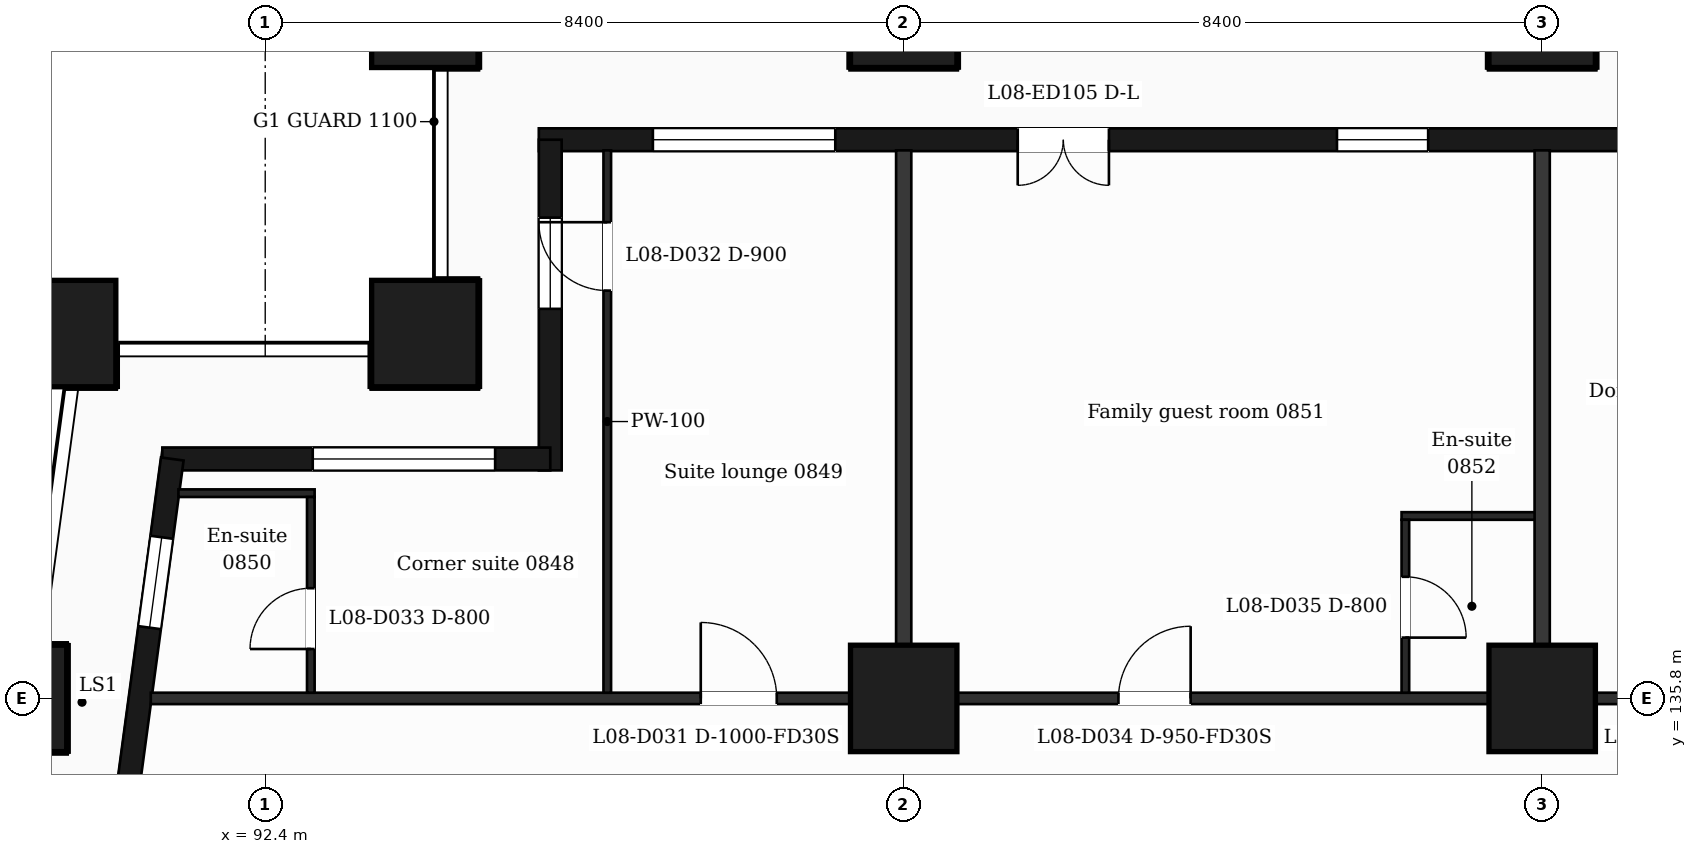
"""IFC4 building model, lengths in metres.
Left out: names, types, materials, properties, quantities, classifications, styles, units other than length and angle.
Written with IfcOpenShell. Run it as: python <this file> out.ifc"""

import sys

from ifc_helpers import new_model, si_unit, direction, frame, frame_2d, origin, origin_2d, place, context, subcontext, project, spatial, rectangle, extrude, element, fill, save


model = new_model("IFC4")
c1 = context("Model", 3, precision=1e-05, world=origin(), true_north=direction((0.0, 1.0)))
c2 = subcontext(c1, "Body", "Model", "MODEL_VIEW")
j1 = project(units=[si_unit("LENGTHUNIT", "METRE"), si_unit("PLANEANGLEUNIT", "RADIAN")], contexts=[c1])
p1 = place(None, origin())
s1 = spatial("IfcSite", under=j1, at=p1, CompositionType="ELEMENT")
p2 = place(p1, origin())
s2 = spatial("IfcBuilding", under=s1, at=p2, CompositionType="ELEMENT")
p3 = place(p2, frame((0.0, 0.0, 46.0)))
s3 = spatial("IfcBuildingStorey", under=s2, at=p3, CompositionType="ELEMENT", Elevation=46.0)
for number, where, z_axis, x_axis in (
    (1, (94.5, 140.6, 0.0), (0.0, 0.0, 1.0), (1.0, 0.0, 0.0)),
    (2, (89.735, 140.6, 0.0), (0.0, 0.0, 1.0), (1.0, 0.0, 0.0)),
    (3, (100.8, 135.8, 0.0), (0.0, 0.0, 1.0), (1.0, 0.0, 0.0)),
    (4, (109.2, 135.8, 0.0), (0.0, 0.0, 1.0), (1.0, 0.0, 0.0)),
    (5, (89.088, 135.8, 0.0), (0.0, 0.0, 1.0), (1.0, 0.0, 0.0)),
    (6, (100.8, 144.8, 0.0), (0.0, 0.0, 1.0), (1.0, 0.0, 0.0)),
    (7, (109.2, 144.8, 0.0), (0.0, 0.0, 1.0), (1.0, 0.0, 0.0)),
    (8, (94.5, 144.8, 0.0), (0.0, 0.0, 1.0), (1.0, 0.0, 0.0)),
):
    element("IfcColumn", number, at=place(p3, frame(where, z_axis=z_axis, x_axis=x_axis)), inside=s3, PredefinedType="COLUMN", context=c2, shape_type="SweptSolid", body=[
        extrude(rectangle(XDim=1.4, YDim=1.4, at=origin_2d()), origin(), (0.0, 0.0, 1.0), 3.5),
    ])
p4 = place(p3, frame((110.4, 143.15, 0.0), z_axis=(0.0, 0.0, 1.0), x_axis=(-1.0, 0.0, 0.0)))
e9 = element("IfcWall", 9, at=p4, inside=s3, PredefinedType="SOLIDWALL", context=c2, shape_type="SweptSolid", body=[
    extrude(rectangle(XDim=14.4, YDim=0.3, at=frame_2d((7.2, 0.0))), origin(), (0.0, 0.0, 1.0), 3.18),
])
p5 = place(p4, frame((2.7, 0.0, 0.9)))
e10 = element("IfcOpeningElement", 10, at=p5, cuts=e9, PredefinedType="OPENING", context=c2, shape_type="SweptSolid", body=[
    extrude(rectangle(XDim=1.2, YDim=2.1, at=frame_2d((0.6, 1.05))), frame((0.0, 0.16, 0.0), z_axis=(0.0, -1.0, 0.0), x_axis=(1.0, 0.0, 0.0)), (0.0, 0.0, 1.0), 0.32),
])
p6 = place(p4, frame((6.9, 0.0, 0.0)))
e11 = element("IfcOpeningElement", 11, at=p6, cuts=e9, PredefinedType="OPENING", context=c2, shape_type="SweptSolid", body=[
    extrude(rectangle(XDim=1.2, YDim=2.4, at=frame_2d((0.6, 1.2))), frame((0.0, 0.16, 0.0), z_axis=(0.0, -1.0, 0.0), x_axis=(1.0, 0.0, 0.0)), (0.0, 0.0, 1.0), 0.32),
])
p7 = place(p4, frame((10.5, 0.0, 0.9)))
e12 = element("IfcOpeningElement", 12, at=p7, cuts=e9, PredefinedType="OPENING", context=c2, shape_type="SweptSolid", body=[
    extrude(rectangle(XDim=2.4, YDim=2.1, at=frame_2d((1.2, 1.05))), frame((0.0, 0.16, 0.0), z_axis=(0.0, -1.0, 0.0), x_axis=(1.0, 0.0, 0.0)), (0.0, 0.0, 1.0), 0.32),
])
p8 = place(p3, frame((96.15, 143.15, 0.0), z_axis=(0.0, 0.0, 1.0), x_axis=(0.0, -1.0, 0.0)))
e13 = element("IfcWall", 13, at=p8, inside=s3, PredefinedType="SOLIDWALL", context=c2, shape_type="SweptSolid", body=[
    extrude(rectangle(XDim=4.35, YDim=0.3, at=frame_2d((2.175, 0.0))), origin(), (0.0, 0.0, 1.0), 3.18),
])
p9 = place(p8, frame((1.025, 0.0, 0.9)))
e14 = element("IfcOpeningElement", 14, at=p9, cuts=e13, PredefinedType="OPENING", context=c2, shape_type="SweptSolid", body=[
    extrude(rectangle(XDim=1.2, YDim=2.1, at=frame_2d((0.6, 1.05))), frame((0.0, 0.16, 0.0), z_axis=(0.0, -1.0, 0.0), x_axis=(1.0, 0.0, 0.0)), (0.0, 0.0, 1.0), 0.32),
])
p10 = place(p3, frame((96.15, 138.95, 0.0), z_axis=(0.0, 0.0, 1.0), x_axis=(-1.0, 0.0, 0.0)))
e15 = element("IfcWall", 15, at=p10, inside=s3, PredefinedType="SOLIDWALL", context=c2, shape_type="SweptSolid", body=[
    extrude(rectangle(XDim=5.104, YDim=0.3, at=frame_2d((2.552, 0.0))), origin(), (0.0, 0.0, 1.0), 3.18),
])
p11 = place(p10, frame((0.725, 0.0, 0.9)))
e16 = element("IfcOpeningElement", 16, at=p11, cuts=e15, PredefinedType="OPENING", context=c2, shape_type="SweptSolid", body=[
    extrude(rectangle(XDim=2.4, YDim=2.1, at=frame_2d((1.2, 1.05))), frame((0.0, 0.16, 0.0), z_axis=(0.0, -1.0, 0.0), x_axis=(1.0, 0.0, 0.0)), (0.0, 0.0, 1.0), 0.32),
])
p12 = place(p3, frame((91.177, 138.95, 0.0), z_axis=(0.0, 0.0, 1.0), x_axis=(-0.133426664613, -0.991058689065, 0.0)))
e17 = element("IfcWall", 17, at=p12, inside=s3, PredefinedType="SOLIDWALL", context=c2, shape_type="SweptSolid", body=[
    extrude(rectangle(XDim=6.609, YDim=0.3, at=frame_2d((3.305, 0.0))), origin(), (0.0, 0.0, 1.0), 3.18),
])
p13 = place(p12, frame((1.039, 0.0, 0.9)))
e18 = element("IfcOpeningElement", 18, at=p13, cuts=e17, PredefinedType="OPENING", context=c2, shape_type="SweptSolid", body=[
    extrude(rectangle(XDim=1.2, YDim=2.1, at=frame_2d((0.6, 1.05))), frame((0.0, 0.16, 0.0), z_axis=(0.0, -1.0, 0.0), x_axis=(1.0, 0.0, 0.0)), (0.0, 0.0, 1.0), 0.32),
])
p14 = place(p12, frame((4.294, 0.0, 0.0)))
e19 = element("IfcOpeningElement", 19, at=p14, cuts=e17, PredefinedType="OPENING", context=c2, shape_type="SweptSolid", body=[
    extrude(rectangle(XDim=1.2, YDim=2.4, at=frame_2d((0.6, 1.2))), frame((0.0, 0.16, 0.0), z_axis=(0.0, -1.0, 0.0), x_axis=(1.0, 0.0, 0.0)), (0.0, 0.0, 1.0), 0.32),
])
p15 = place(p3, frame((90.895, 135.8, 0.0), z_axis=(0.0, 0.0, 1.0), x_axis=(1.0, 0.0, 0.0)))
e20 = element("IfcWall", 20, at=p15, inside=s3, PredefinedType="PARTITIONING", context=c2, shape_type="SweptSolid", body=[
    extrude(rectangle(XDim=45.011, YDim=0.15, at=frame_2d((22.505, 0.0))), origin(), (0.0, 0.0, 1.0), 3.18),
])
p16 = place(p15, frame((7.235, 0.0, 0.0)))
e21 = element("IfcOpeningElement", 21, at=p16, cuts=e20, PredefinedType="OPENING", context=c2, shape_type="SweptSolid", body=[
    extrude(rectangle(XDim=1.0, YDim=2.1, at=frame_2d((0.5, 1.05))), frame((0.0, 0.085, 0.0), z_axis=(0.0, -1.0, 0.0), x_axis=(1.0, 0.0, 0.0)), (0.0, 0.0, 1.0), 0.17),
])
p17 = place(p15, frame((12.73, 0.0, 0.0)))
e22 = element("IfcOpeningElement", 22, at=p17, cuts=e20, PredefinedType="OPENING", context=c2, shape_type="SweptSolid", body=[
    extrude(rectangle(XDim=0.95, YDim=2.1, at=frame_2d((0.475, 1.05))), frame((0.0, 0.085, 0.0), z_axis=(0.0, -1.0, 0.0), x_axis=(1.0, 0.0, 0.0)), (0.0, 0.0, 1.0), 0.17),
])
p18 = place(p15, frame((20.185, 0.0, 0.0)))
e23 = element("IfcOpeningElement", 23, at=p18, cuts=e20, PredefinedType="OPENING", context=c2, shape_type="SweptSolid", body=[
    extrude(rectangle(XDim=0.95, YDim=2.1, at=frame_2d((0.475, 1.05))), frame((0.0, 0.085, 0.0), z_axis=(0.0, -1.0, 0.0), x_axis=(1.0, 0.0, 0.0)), (0.0, 0.0, 1.0), 0.17),
])
p19 = place(p15, frame((24.531, 0.0, 0.0)))
e24 = element("IfcOpeningElement", 24, at=p19, cuts=e20, PredefinedType="OPENING", context=c2, shape_type="SweptSolid", body=[
    extrude(rectangle(XDim=1.0, YDim=2.1, at=frame_2d((0.5, 1.05))), frame((0.0, 0.085, 0.0), z_axis=(0.0, -1.0, 0.0), x_axis=(1.0, 0.0, 0.0)), (0.0, 0.0, 1.0), 0.17),
])
p20 = place(p15, frame((39.814, 0.0, 0.0)))
e25 = element("IfcOpeningElement", 25, at=p20, cuts=e20, PredefinedType="OPENING", context=c2, shape_type="SweptSolid", body=[
    extrude(rectangle(XDim=0.95, YDim=2.1, at=frame_2d((0.475, 1.05))), frame((0.0, 0.085, 0.0), z_axis=(0.0, -1.0, 0.0), x_axis=(1.0, 0.0, 0.0)), (0.0, 0.0, 1.0), 0.17),
])
p21 = place(p3, frame((107.35, 138.2, 0.0), z_axis=(0.0, 0.0, 1.0), x_axis=(1.0, 0.0, 0.0)))
e26 = element("IfcWall", 26, at=p21, inside=s3, PredefinedType="PARTITIONING", context=c2, shape_type="SweptSolid", body=[
    extrude(rectangle(XDim=1.85, YDim=0.1, at=frame_2d((0.925, 0.0))), origin(), (0.0, 0.0, 1.0), 3.18),
])
p22 = place(p3, frame((91.258, 138.5, 0.0), z_axis=(0.0, 0.0, 1.0), x_axis=(1.0, 0.0, 0.0)))
e27 = element("IfcWall", 27, at=p22, inside=s3, PredefinedType="PARTITIONING", context=c2, shape_type="SweptSolid", body=[
    extrude(rectangle(XDim=1.792, YDim=0.1, at=frame_2d((0.896, 0.0))), origin(), (0.0, 0.0, 1.0), 3.18),
])
p23 = place(p3, frame((93.0, 135.875, 0.0), z_axis=(0.0, 0.0, 1.0), x_axis=(0.0, 1.0, 0.0)))
e28 = element("IfcWall", 28, at=p23, inside=s3, PredefinedType="PARTITIONING", context=c2, shape_type="SweptSolid", body=[
    extrude(rectangle(XDim=2.575, YDim=0.1, at=frame_2d((1.288, 0.0))), origin(), (0.0, 0.0, 1.0), 3.18),
])
p24 = place(p23, frame((0.575, 0.0, 0.0)))
e29 = element("IfcOpeningElement", 29, at=p24, cuts=e28, PredefinedType="OPENING", context=c2, shape_type="SweptSolid", body=[
    extrude(rectangle(XDim=0.8, YDim=2.1, at=frame_2d((0.4, 1.05))), frame((0.0, 0.06, 0.0), z_axis=(0.0, -1.0, 0.0), x_axis=(1.0, 0.0, 0.0)), (0.0, 0.0, 1.0), 0.12),
])
p25 = place(p3, frame((96.9, 135.875, 0.0), z_axis=(0.0, 0.0, 1.0), x_axis=(0.0, 1.0, 0.0)))
e30 = element("IfcWall", 30, at=p25, inside=s3, PredefinedType="PARTITIONING", context=c2, shape_type="SweptSolid", body=[
    extrude(rectangle(XDim=7.135, YDim=0.1, at=frame_2d((3.567, 0.0))), origin(), (0.0, 0.0, 1.0), 3.18),
])
p26 = place(p25, frame((5.29, 0.0, 0.0)))
e31 = element("IfcOpeningElement", 31, at=p26, cuts=e30, PredefinedType="OPENING", context=c2, shape_type="SweptSolid", body=[
    extrude(rectangle(XDim=0.9, YDim=2.1, at=frame_2d((0.45, 1.05))), frame((0.0, 0.06, 0.0), z_axis=(0.0, -1.0, 0.0), x_axis=(1.0, 0.0, 0.0)), (0.0, 0.0, 1.0), 0.12),
])
p27 = place(p3, frame((100.8, 135.875, 0.0), z_axis=(0.0, 0.0, 1.0), x_axis=(0.0, 1.0, 0.0)))
e32 = element("IfcWall", 32, at=p27, inside=s3, PredefinedType="PARTITIONING", context=c2, shape_type="SweptSolid", body=[
    extrude(rectangle(XDim=7.135, YDim=0.2, at=frame_2d((3.567, 0.0))), origin(), (0.0, 0.0, 1.0), 3.18),
])
p28 = place(p3, frame((107.4, 135.875, 0.0), z_axis=(0.0, 0.0, 1.0), x_axis=(0.0, 1.0, 0.0)))
e33 = element("IfcWall", 33, at=p28, inside=s3, PredefinedType="PARTITIONING", context=c2, shape_type="SweptSolid", body=[
    extrude(rectangle(XDim=2.275, YDim=0.1, at=frame_2d((1.137, 0.0))), origin(), (0.0, 0.0, 1.0), 3.18),
])
p29 = place(p28, frame((0.725, 0.0, 0.0)))
e34 = element("IfcOpeningElement", 34, at=p29, cuts=e33, PredefinedType="OPENING", context=c2, shape_type="SweptSolid", body=[
    extrude(rectangle(XDim=0.8, YDim=2.1, at=frame_2d((0.4, 1.05))), frame((0.0, 0.06, 0.0), z_axis=(0.0, -1.0, 0.0), x_axis=(1.0, 0.0, 0.0)), (0.0, 0.0, 1.0), 0.12),
])
p30 = place(p3, frame((109.2, 135.875, 0.0), z_axis=(0.0, 0.0, 1.0), x_axis=(0.0, 1.0, 0.0)))
e35 = element("IfcWall", 35, at=p30, inside=s3, PredefinedType="PARTITIONING", context=c2, shape_type="SweptSolid", body=[
    extrude(rectangle(XDim=7.135, YDim=0.2, at=frame_2d((3.567, 0.0))), origin(), (0.0, 0.0, 1.0), 3.18),
])
p31 = place(p5, origin())
e36 = element("IfcWindow", 36, at=p31, inside=s3, PartitioningType="SINGLE_PANEL", PredefinedType="WINDOW", context=c2, shape_type="SweptSolid", body=[
    extrude(rectangle(XDim=1.2, YDim=2.1, at=frame_2d((0.6, 1.05))), frame((0.0, 0.03, 0.0), z_axis=(0.0, -1.0, 0.0), x_axis=(1.0, 0.0, 0.0)), (0.0, 0.0, 1.0), 0.06),
])
fill(e10, e36)
p32 = place(p6, origin())
e37 = element("IfcDoor", 37, at=p32, inside=s3, OperationType="DOUBLE_DOOR_SINGLE_SWING", PredefinedType="DOOR", context=c2, shape_type="SweptSolid", body=[
    extrude(rectangle(XDim=1.2, YDim=2.4, at=frame_2d((0.6, 1.2))), frame((0.0, 0.025, 0.0), z_axis=(0.0, -1.0, 0.0), x_axis=(1.0, 0.0, 0.0)), (0.0, 0.0, 1.0), 0.05),
])
fill(e11, e37)
p33 = place(p7, origin())
e38 = element("IfcWindow", 38, at=p33, inside=s3, PartitioningType="SINGLE_PANEL", PredefinedType="WINDOW", context=c2, shape_type="SweptSolid", body=[
    extrude(rectangle(XDim=2.4, YDim=2.1, at=frame_2d((1.2, 1.05))), frame((0.0, 0.03, 0.0), z_axis=(0.0, -1.0, 0.0), x_axis=(1.0, 0.0, 0.0)), (0.0, 0.0, 1.0), 0.06),
])
fill(e12, e38)
p34 = place(p9, origin())
e39 = element("IfcWindow", 39, at=p34, inside=s3, PartitioningType="SINGLE_PANEL", PredefinedType="WINDOW", context=c2, shape_type="SweptSolid", body=[
    extrude(rectangle(XDim=1.2, YDim=2.1, at=frame_2d((0.6, 1.05))), frame((0.0, 0.03, 0.0), z_axis=(0.0, -1.0, 0.0), x_axis=(1.0, 0.0, 0.0)), (0.0, 0.0, 1.0), 0.06),
])
fill(e14, e39)
p35 = place(p11, origin())
e40 = element("IfcWindow", 40, at=p35, inside=s3, PartitioningType="SINGLE_PANEL", PredefinedType="WINDOW", context=c2, shape_type="SweptSolid", body=[
    extrude(rectangle(XDim=2.4, YDim=2.1, at=frame_2d((1.2, 1.05))), frame((0.0, 0.03, 0.0), z_axis=(0.0, -1.0, 0.0), x_axis=(1.0, 0.0, 0.0)), (0.0, 0.0, 1.0), 0.06),
])
fill(e16, e40)
p36 = place(p13, origin())
e41 = element("IfcWindow", 41, at=p36, inside=s3, PartitioningType="SINGLE_PANEL", PredefinedType="WINDOW", context=c2, shape_type="SweptSolid", body=[
    extrude(rectangle(XDim=1.2, YDim=2.1, at=frame_2d((0.6, 1.05))), frame((0.0, 0.03, 0.0), z_axis=(0.0, -1.0, 0.0), x_axis=(1.0, 0.0, 0.0)), (0.0, 0.0, 1.0), 0.06),
])
fill(e18, e41)
p37 = place(p16, origin())
e42 = element("IfcDoor", 42, at=p37, inside=s3, OperationType="SINGLE_SWING_LEFT", PredefinedType="DOOR", context=c2, shape_type="SweptSolid", body=[
    extrude(rectangle(XDim=1.0, YDim=2.1, at=frame_2d((0.5, 1.05))), frame((0.0, 0.025, 0.0), z_axis=(0.0, -1.0, 0.0), x_axis=(1.0, 0.0, 0.0)), (0.0, 0.0, 1.0), 0.05),
])
fill(e21, e42)
p38 = place(p26, origin())
e43 = element("IfcDoor", 43, at=p38, inside=s3, OperationType="SINGLE_SWING_RIGHT", PredefinedType="DOOR", context=c2, shape_type="SweptSolid", body=[
    extrude(rectangle(XDim=0.9, YDim=2.1, at=frame_2d((0.45, 1.05))), frame((0.0, 0.025, 0.0), z_axis=(0.0, -1.0, 0.0), x_axis=(1.0, 0.0, 0.0)), (0.0, 0.0, 1.0), 0.05),
])
fill(e31, e43)
p39 = place(p24, origin())
e44 = element("IfcDoor", 44, at=p39, inside=s3, OperationType="SINGLE_SWING_LEFT", PredefinedType="DOOR", context=c2, shape_type="SweptSolid", body=[
    extrude(rectangle(XDim=0.8, YDim=2.1, at=frame_2d((0.4, 1.05))), frame((0.0, 0.025, 0.0), z_axis=(0.0, -1.0, 0.0), x_axis=(1.0, 0.0, 0.0)), (0.0, 0.0, 1.0), 0.05),
])
fill(e29, e44)
p40 = place(p17, origin())
e45 = element("IfcDoor", 45, at=p40, inside=s3, OperationType="SINGLE_SWING_RIGHT", PredefinedType="DOOR", context=c2, shape_type="SweptSolid", body=[
    extrude(rectangle(XDim=0.95, YDim=2.1, at=frame_2d((0.475, 1.05))), frame((0.0, 0.025, 0.0), z_axis=(0.0, -1.0, 0.0), x_axis=(1.0, 0.0, 0.0)), (0.0, 0.0, 1.0), 0.05),
])
fill(e22, e45)
p41 = place(p29, origin())
e46 = element("IfcDoor", 46, at=p41, inside=s3, OperationType="SINGLE_SWING_LEFT", PredefinedType="DOOR", context=c2, shape_type="SweptSolid", body=[
    extrude(rectangle(XDim=0.8, YDim=2.1, at=frame_2d((0.4, 1.05))), frame((0.0, 0.025, 0.0), z_axis=(0.0, -1.0, 0.0), x_axis=(1.0, 0.0, 0.0)), (0.0, 0.0, 1.0), 0.05),
])
fill(e34, e46)
save(model, sys.argv[1])
